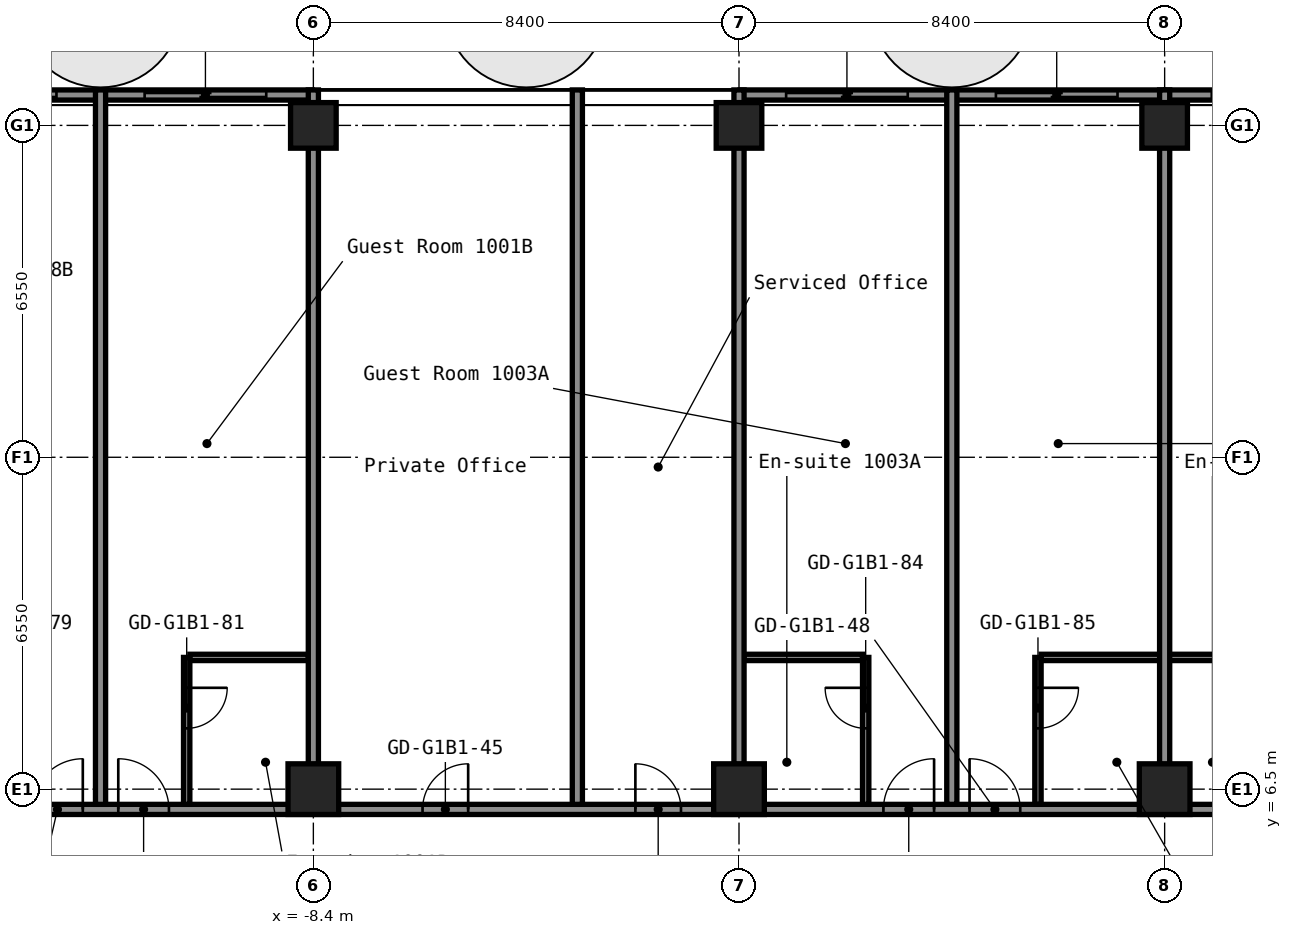
"""IFC4 building model, lengths in metres.
Left out: names, types, materials, properties, quantities, classifications, styles, units other than length and angle.
Written with IfcOpenShell. Run it as: python <this file> out.ifc"""

import sys

from ifc_helpers import new_model, si_unit, direction, frame, frame_2d, origin, origin_2d, place, context, subcontext, project, spatial, rectangle, hollow_rectangle, extrude, element, fill, save


model = new_model("IFC4")
c1 = context("Model", 3, precision=1e-05, world=origin(), true_north=direction((0.0, 1.0)))
c2 = subcontext(c1, "Body", "Model", "MODEL_VIEW")
j1 = project(units=[si_unit("LENGTHUNIT", "METRE"), si_unit("PLANEANGLEUNIT", "RADIAN")], contexts=[c1])
p1 = place(None, origin())
s1 = spatial("IfcSite", under=j1, at=p1, CompositionType="ELEMENT")
p2 = place(p1, origin())
s2 = spatial("IfcBuilding", under=s1, at=p2, CompositionType="ELEMENT")
p3 = place(p2, frame((0.0, 0.0, 39.0)))
s3 = spatial("IfcBuildingStorey", under=s2, at=p3, CompositionType="ELEMENT", Elevation=39.0)
p4 = place(p3, frame((-8.4, 6.5, 0.0), z_axis=(0.0, 0.0, 1.0), x_axis=(1.0, 0.0, 0.0)))
e1 = element("IfcColumn", 1, at=p4, inside=s3, PredefinedType="COLUMN", context=c2, shape_type="SweptSolid", body=[
    extrude(hollow_rectangle(XDim=1.0, YDim=1.0, WallThickness=0.04, at=origin_2d()), origin(), (0.0, 0.0, 1.0), 2.8),
])
p5 = place(p3, frame((-8.4, 19.6, 0.0), z_axis=(0.0, 0.0, 1.0), x_axis=(1.0, 0.0, 0.0)))
e2 = element("IfcColumn", 2, at=p5, inside=s3, PredefinedType="COLUMN", context=c2, shape_type="SweptSolid", body=[
    extrude(hollow_rectangle(XDim=0.9, YDim=0.9, WallThickness=0.036, at=origin_2d()), origin(), (0.0, 0.0, 1.0), 2.8),
])
p6 = place(p3, frame((0.0, 6.5, 0.0), z_axis=(0.0, 0.0, 1.0), x_axis=(1.0, 0.0, 0.0)))
e3 = element("IfcColumn", 3, at=p6, inside=s3, PredefinedType="COLUMN", context=c2, shape_type="SweptSolid", body=[
    extrude(hollow_rectangle(XDim=1.0, YDim=1.0, WallThickness=0.04, at=origin_2d()), origin(), (0.0, 0.0, 1.0), 2.8),
])
p7 = place(p3, frame((0.0, 19.6, 0.0), z_axis=(0.0, 0.0, 1.0), x_axis=(1.0, 0.0, 0.0)))
e4 = element("IfcColumn", 4, at=p7, inside=s3, PredefinedType="COLUMN", context=c2, shape_type="SweptSolid", body=[
    extrude(hollow_rectangle(XDim=0.9, YDim=0.9, WallThickness=0.036, at=origin_2d()), origin(), (0.0, 0.0, 1.0), 2.8),
])
p8 = place(p3, frame((8.4, 6.5, 0.0), z_axis=(0.0, 0.0, 1.0), x_axis=(1.0, 0.0, 0.0)))
e5 = element("IfcColumn", 5, at=p8, inside=s3, PredefinedType="COLUMN", context=c2, shape_type="SweptSolid", body=[
    extrude(hollow_rectangle(XDim=1.0, YDim=1.0, WallThickness=0.04, at=origin_2d()), origin(), (0.0, 0.0, 1.0), 2.8),
])
p9 = place(p3, frame((8.4, 19.6, 0.0), z_axis=(0.0, 0.0, 1.0), x_axis=(1.0, 0.0, 0.0)))
e6 = element("IfcColumn", 6, at=p9, inside=s3, PredefinedType="COLUMN", context=c2, shape_type="SweptSolid", body=[
    extrude(hollow_rectangle(XDim=0.9, YDim=0.9, WallThickness=0.036, at=origin_2d()), origin(), (0.0, 0.0, 1.0), 2.8),
])
p10 = place(p3, frame((-16.8, 6.1, 0.0), z_axis=(0.0, 0.0, 1.0), x_axis=(1.0, 0.0, 0.0)))
e7 = element("IfcWall", 7, at=p10, inside=s3, PredefinedType="PARTITIONING", context=c2, shape_type="SweptSolid", body=[
    extrude(rectangle(XDim=33.6, YDim=0.2, at=frame_2d((16.8, 0.0))), origin(), (0.0, 0.0, 1.0), 2.8),
])
p11 = place(p10, frame((2.85, 0.0, 0.0)))
e8 = element("IfcOpeningElement", 8, at=p11, cuts=e7, PredefinedType="OPENING", context=c2, shape_type="SweptSolid", body=[
    extrude(rectangle(XDim=1.0, YDim=2.1, at=frame_2d((0.5, 1.05))), frame((0.0, 0.11, 0.0), z_axis=(0.0, -1.0, 0.0), x_axis=(1.0, 0.0, 0.0)), (0.0, 0.0, 1.0), 0.22),
])
p12 = place(p10, frame((4.55, 0.0, 0.0)))
e9 = element("IfcOpeningElement", 9, at=p12, cuts=e7, PredefinedType="OPENING", context=c2, shape_type="SweptSolid", body=[
    extrude(rectangle(XDim=1.0, YDim=2.1, at=frame_2d((0.5, 1.05))), frame((0.0, 0.11, 0.0), z_axis=(0.0, -1.0, 0.0), x_axis=(1.0, 0.0, 0.0)), (0.0, 0.0, 1.0), 0.22),
])
p13 = place(p10, frame((10.555, 0.0, 0.0)))
e10 = element("IfcOpeningElement", 10, at=p13, cuts=e7, PredefinedType="OPENING", context=c2, shape_type="SweptSolid", body=[
    extrude(rectangle(XDim=0.9, YDim=2.1, at=frame_2d((0.45, 1.05))), frame((0.0, 0.11, 0.0), z_axis=(0.0, -1.0, 0.0), x_axis=(1.0, 0.0, 0.0)), (0.0, 0.0, 1.0), 0.22),
])
p14 = place(p10, frame((14.755, 0.0, 0.0)))
e11 = element("IfcOpeningElement", 11, at=p14, cuts=e7, PredefinedType="OPENING", context=c2, shape_type="SweptSolid", body=[
    extrude(rectangle(XDim=0.9, YDim=2.1, at=frame_2d((0.45, 1.05))), frame((0.0, 0.11, 0.0), z_axis=(0.0, -1.0, 0.0), x_axis=(1.0, 0.0, 0.0)), (0.0, 0.0, 1.0), 0.22),
])
p15 = place(p10, frame((19.65, 0.0, 0.0)))
e12 = element("IfcOpeningElement", 12, at=p15, cuts=e7, PredefinedType="OPENING", context=c2, shape_type="SweptSolid", body=[
    extrude(rectangle(XDim=1.0, YDim=2.1, at=frame_2d((0.5, 1.05))), frame((0.0, 0.11, 0.0), z_axis=(0.0, -1.0, 0.0), x_axis=(1.0, 0.0, 0.0)), (0.0, 0.0, 1.0), 0.22),
])
p16 = place(p10, frame((21.35, 0.0, 0.0)))
e13 = element("IfcOpeningElement", 13, at=p16, cuts=e7, PredefinedType="OPENING", context=c2, shape_type="SweptSolid", body=[
    extrude(rectangle(XDim=1.0, YDim=2.1, at=frame_2d((0.5, 1.05))), frame((0.0, 0.11, 0.0), z_axis=(0.0, -1.0, 0.0), x_axis=(1.0, 0.0, 0.0)), (0.0, 0.0, 1.0), 0.22),
])
p17 = place(p10, frame((28.05, 0.0, 0.0)))
e14 = element("IfcOpeningElement", 14, at=p17, cuts=e7, PredefinedType="OPENING", context=c2, shape_type="SweptSolid", body=[
    extrude(rectangle(XDim=1.0, YDim=2.1, at=frame_2d((0.5, 1.05))), frame((0.0, 0.11, 0.0), z_axis=(0.0, -1.0, 0.0), x_axis=(1.0, 0.0, 0.0)), (0.0, 0.0, 1.0), 0.22),
])
p18 = place(p10, frame((29.75, 0.0, 0.0)))
e15 = element("IfcOpeningElement", 15, at=p18, cuts=e7, PredefinedType="OPENING", context=c2, shape_type="SweptSolid", body=[
    extrude(rectangle(XDim=1.0, YDim=2.1, at=frame_2d((0.5, 1.05))), frame((0.0, 0.11, 0.0), z_axis=(0.0, -1.0, 0.0), x_axis=(1.0, 0.0, 0.0)), (0.0, 0.0, 1.0), 0.22),
])
for number, where, z_axis, x_axis in (
    (16, (-10.837, 9.1, 0.0), (0.0, 0.0, 1.0), (1.0, 0.0, 0.0)),
    (17, (0.1, 9.1, 0.0), (0.0, 0.0, 1.0), (1.0, 0.0, 0.0)),
):
    element("IfcWall", number, at=place(p3, frame(where, z_axis=z_axis, x_axis=x_axis)), inside=s3, PredefinedType="PARTITIONING", context=c2, shape_type="SweptSolid", body=[
        extrude(rectangle(XDim=2.337, YDim=0.125, at=frame_2d((1.169, 0.0))), origin(), (0.0, 0.0, 1.0), 2.8),
    ])
p19 = place(p3, frame((5.962, 9.1, 0.0), z_axis=(0.0, 0.0, 1.0), x_axis=(1.0, 0.0, 0.0)))
e18 = element("IfcWall", 18, at=p19, inside=s3, PredefinedType="PARTITIONING", context=c2, shape_type="SweptSolid", body=[
    extrude(rectangle(XDim=4.875, YDim=0.125, at=frame_2d((2.438, 0.0))), origin(), (0.0, 0.0, 1.0), 2.8),
])
p20 = place(p3, frame((-12.6, 6.2, 0.0), z_axis=(0.0, 0.0, 1.0), x_axis=(0.0, 1.0, 0.0)))
e19 = element("IfcWall", 19, at=p20, inside=s3, PredefinedType="PARTITIONING", context=c2, shape_type="SweptSolid", body=[
    extrude(rectangle(XDim=14.1, YDim=0.2, at=frame_2d((7.05, 0.0))), origin(), (0.0, 0.0, 1.0), 2.8),
])
p21 = place(p3, frame((-10.9, 6.2, 0.0), z_axis=(0.0, 0.0, 1.0), x_axis=(0.0, 1.0, 0.0)))
e20 = element("IfcWall", 20, at=p21, inside=s3, PredefinedType="PARTITIONING", context=c2, shape_type="SweptSolid", body=[
    extrude(rectangle(XDim=2.9, YDim=0.125, at=frame_2d((1.45, 0.0))), origin(), (0.0, 0.0, 1.0), 2.8),
])
p22 = place(p21, frame((1.5, 0.0, 0.0)))
e21 = element("IfcOpeningElement", 21, at=p22, cuts=e20, PredefinedType="OPENING", context=c2, shape_type="SweptSolid", body=[
    extrude(rectangle(XDim=0.8, YDim=2.1, at=frame_2d((0.4, 1.05))), frame((0.0, 0.073, 0.0), z_axis=(0.0, -1.0, 0.0), x_axis=(1.0, 0.0, 0.0)), (0.0, 0.0, 1.0), 0.145),
])
p23 = place(p3, frame((-8.4, 6.99, 0.0), z_axis=(0.0, 0.0, 1.0), x_axis=(0.0, 1.0, 0.0)))
e22 = element("IfcWall", 22, at=p23, inside=s3, PredefinedType="PARTITIONING", context=c2, shape_type="SweptSolid", body=[
    extrude(rectangle(XDim=13.31, YDim=0.2, at=frame_2d((6.655, 0.0))), origin(), (0.0, 0.0, 1.0), 2.8),
])
p24 = place(p3, frame((-3.19, 6.2, 0.0), z_axis=(0.0, 0.0, 1.0), x_axis=(0.0, 1.0, 0.0)))
e23 = element("IfcWall", 23, at=p24, inside=s3, PredefinedType="PARTITIONING", context=c2, shape_type="SweptSolid", body=[
    extrude(rectangle(XDim=14.1, YDim=0.2, at=frame_2d((7.05, 0.0))), origin(), (0.0, 0.0, 1.0), 2.8),
])
p25 = place(p3, frame((0.0, 6.99, 0.0), z_axis=(0.0, 0.0, 1.0), x_axis=(0.0, 1.0, 0.0)))
e24 = element("IfcWall", 24, at=p25, inside=s3, PredefinedType="PARTITIONING", context=c2, shape_type="SweptSolid", body=[
    extrude(rectangle(XDim=13.31, YDim=0.2, at=frame_2d((6.655, 0.0))), origin(), (0.0, 0.0, 1.0), 2.8),
])
p26 = place(p3, frame((2.5, 6.2, 0.0), z_axis=(0.0, 0.0, 1.0), x_axis=(0.0, 1.0, 0.0)))
e25 = element("IfcWall", 25, at=p26, inside=s3, PredefinedType="PARTITIONING", context=c2, shape_type="SweptSolid", body=[
    extrude(rectangle(XDim=2.9, YDim=0.125, at=frame_2d((1.45, 0.0))), origin(), (0.0, 0.0, 1.0), 2.8),
])
p27 = place(p26, frame((1.5, 0.0, 0.0)))
e26 = element("IfcOpeningElement", 26, at=p27, cuts=e25, PredefinedType="OPENING", context=c2, shape_type="SweptSolid", body=[
    extrude(rectangle(XDim=0.8, YDim=2.1, at=frame_2d((0.4, 1.05))), frame((0.0, 0.073, 0.0), z_axis=(0.0, -1.0, 0.0), x_axis=(1.0, 0.0, 0.0)), (0.0, 0.0, 1.0), 0.145),
])
p28 = place(p3, frame((4.2, 6.2, 0.0), z_axis=(0.0, 0.0, 1.0), x_axis=(0.0, 1.0, 0.0)))
e27 = element("IfcWall", 27, at=p28, inside=s3, PredefinedType="PARTITIONING", context=c2, shape_type="SweptSolid", body=[
    extrude(rectangle(XDim=14.1, YDim=0.2, at=frame_2d((7.05, 0.0))), origin(), (0.0, 0.0, 1.0), 2.8),
])
p29 = place(p3, frame((5.9, 6.2, 0.0), z_axis=(0.0, 0.0, 1.0), x_axis=(0.0, 1.0, 0.0)))
e28 = element("IfcWall", 28, at=p29, inside=s3, PredefinedType="PARTITIONING", context=c2, shape_type="SweptSolid", body=[
    extrude(rectangle(XDim=2.9, YDim=0.125, at=frame_2d((1.45, 0.0))), origin(), (0.0, 0.0, 1.0), 2.8),
])
p30 = place(p29, frame((1.5, 0.0, 0.0)))
e29 = element("IfcOpeningElement", 29, at=p30, cuts=e28, PredefinedType="OPENING", context=c2, shape_type="SweptSolid", body=[
    extrude(rectangle(XDim=0.8, YDim=2.1, at=frame_2d((0.4, 1.05))), frame((0.0, 0.073, 0.0), z_axis=(0.0, -1.0, 0.0), x_axis=(1.0, 0.0, 0.0)), (0.0, 0.0, 1.0), 0.145),
])
p31 = place(p3, frame((8.4, 6.99, 0.0), z_axis=(0.0, 0.0, 1.0), x_axis=(0.0, 1.0, 0.0)))
e30 = element("IfcWall", 30, at=p31, inside=s3, PredefinedType="PARTITIONING", context=c2, shape_type="SweptSolid", body=[
    extrude(rectangle(XDim=13.31, YDim=0.2, at=frame_2d((6.655, 0.0))), origin(), (0.0, 0.0, 1.0), 2.8),
])
p32 = place(p3, frame((12.64, 20.2, 0.0), z_axis=(0.0, 0.0, 1.0), x_axis=(-1.0, 0.0, 0.0)))
p33 = place(p32, frame((0.91, 0.0, 0.0)))
p34 = place(p33, frame((2.4, 0.0, 0.0), z_axis=(0.0, 0.0, 1.0), x_axis=(-1.0, 0.0, 0.0)))
e31 = element("IfcDoor", 31, at=p34, inside=s3, OperationType="SLIDING_TO_LEFT", PredefinedType="DOOR", context=c2, shape_type="SweptSolid", body=[
    extrude(rectangle(XDim=2.4, YDim=2.2, at=frame_2d((1.2, 1.1))), frame((0.0, 0.025, 0.0), z_axis=(0.0, -1.0, 0.0), x_axis=(1.0, 0.0, 0.0)), (0.0, 0.0, 1.0), 0.05),
])
p35 = place(p3, frame((8.38, 20.2, 0.0), z_axis=(0.0, 0.0, 1.0), x_axis=(-1.0, 0.0, 0.0)))
p36 = place(p35, frame((0.91, 0.0, 0.0)))
p37 = place(p36, frame((2.4, 0.0, 0.0), z_axis=(0.0, 0.0, 1.0), x_axis=(-1.0, 0.0, 0.0)))
e32 = element("IfcDoor", 32, at=p37, inside=s3, OperationType="SLIDING_TO_LEFT", PredefinedType="DOOR", context=c2, shape_type="SweptSolid", body=[
    extrude(rectangle(XDim=2.4, YDim=2.2, at=frame_2d((1.2, 1.1))), frame((0.0, 0.025, 0.0), z_axis=(0.0, -1.0, 0.0), x_axis=(1.0, 0.0, 0.0)), (0.0, 0.0, 1.0), 0.05),
])
p38 = place(p3, frame((4.24, 20.2, 0.0), z_axis=(0.0, 0.0, 1.0), x_axis=(-1.0, 0.0, 0.0)))
p39 = place(p38, frame((0.91, 0.0, 0.0)))
p40 = place(p39, frame((2.4, 0.0, 0.0), z_axis=(0.0, 0.0, 1.0), x_axis=(-1.0, 0.0, 0.0)))
e33 = element("IfcDoor", 33, at=p40, inside=s3, OperationType="SLIDING_TO_LEFT", PredefinedType="DOOR", context=c2, shape_type="SweptSolid", body=[
    extrude(rectangle(XDim=2.4, YDim=2.2, at=frame_2d((1.2, 1.1))), frame((0.0, 0.025, 0.0), z_axis=(0.0, -1.0, 0.0), x_axis=(1.0, 0.0, 0.0)), (0.0, 0.0, 1.0), 0.05),
])
p41 = place(p3, frame((-8.42, 20.2, 0.0), z_axis=(0.0, 0.0, 1.0), x_axis=(-1.0, 0.0, 0.0)))
p42 = place(p41, frame((0.91, 0.0, 0.0)))
p43 = place(p42, frame((2.4, 0.0, 0.0), z_axis=(0.0, 0.0, 1.0), x_axis=(-1.0, 0.0, 0.0)))
e34 = element("IfcDoor", 34, at=p43, inside=s3, OperationType="SLIDING_TO_LEFT", PredefinedType="DOOR", context=c2, shape_type="SweptSolid", body=[
    extrude(rectangle(XDim=2.4, YDim=2.2, at=frame_2d((1.2, 1.1))), frame((0.0, 0.025, 0.0), z_axis=(0.0, -1.0, 0.0), x_axis=(1.0, 0.0, 0.0)), (0.0, 0.0, 1.0), 0.05),
])
p44 = place(p3, frame((-12.56, 20.2, 0.0), z_axis=(0.0, 0.0, 1.0), x_axis=(-1.0, 0.0, 0.0)))
p45 = place(p44, frame((0.91, 0.0, 0.0)))
p46 = place(p45, frame((2.4, 0.0, 0.0), z_axis=(0.0, 0.0, 1.0), x_axis=(-1.0, 0.0, 0.0)))
e35 = element("IfcDoor", 35, at=p46, inside=s3, OperationType="SLIDING_TO_LEFT", PredefinedType="DOOR", context=c2, shape_type="SweptSolid", body=[
    extrude(rectangle(XDim=2.4, YDim=2.2, at=frame_2d((1.2, 1.1))), frame((0.0, 0.025, 0.0), z_axis=(0.0, -1.0, 0.0), x_axis=(1.0, 0.0, 0.0)), (0.0, 0.0, 1.0), 0.05),
])
p47 = place(p11, origin())
e36 = element("IfcDoor", 36, at=p47, inside=s3, OperationType="SINGLE_SWING_LEFT", PredefinedType="DOOR", context=c2, shape_type="SweptSolid", body=[
    extrude(rectangle(XDim=1.0, YDim=2.1, at=frame_2d((0.5, 1.05))), frame((0.0, 0.025, 0.0), z_axis=(0.0, -1.0, 0.0), x_axis=(1.0, 0.0, 0.0)), (0.0, 0.0, 1.0), 0.05),
])
fill(e8, e36)
p48 = place(p12, origin())
e37 = element("IfcDoor", 37, at=p48, inside=s3, OperationType="SINGLE_SWING_RIGHT", PredefinedType="DOOR", context=c2, shape_type="SweptSolid", body=[
    extrude(rectangle(XDim=1.0, YDim=2.1, at=frame_2d((0.5, 1.05))), frame((0.0, 0.025, 0.0), z_axis=(0.0, -1.0, 0.0), x_axis=(1.0, 0.0, 0.0)), (0.0, 0.0, 1.0), 0.05),
])
fill(e9, e37)
p49 = place(p13, origin())
e38 = element("IfcDoor", 38, at=p49, inside=s3, OperationType="SINGLE_SWING_LEFT", PredefinedType="DOOR", context=c2, shape_type="SweptSolid", body=[
    extrude(rectangle(XDim=0.9, YDim=2.1, at=frame_2d((0.45, 1.05))), frame((0.0, 0.025, 0.0), z_axis=(0.0, -1.0, 0.0), x_axis=(1.0, 0.0, 0.0)), (0.0, 0.0, 1.0), 0.05),
])
fill(e10, e38)
p50 = place(p14, origin())
e39 = element("IfcDoor", 39, at=p50, inside=s3, OperationType="SINGLE_SWING_RIGHT", PredefinedType="DOOR", context=c2, shape_type="SweptSolid", body=[
    extrude(rectangle(XDim=0.9, YDim=2.1, at=frame_2d((0.45, 1.05))), frame((0.0, 0.025, 0.0), z_axis=(0.0, -1.0, 0.0), x_axis=(1.0, 0.0, 0.0)), (0.0, 0.0, 1.0), 0.05),
])
fill(e11, e39)
p51 = place(p15, origin())
e40 = element("IfcDoor", 40, at=p51, inside=s3, OperationType="SINGLE_SWING_LEFT", PredefinedType="DOOR", context=c2, shape_type="SweptSolid", body=[
    extrude(rectangle(XDim=1.0, YDim=2.1, at=frame_2d((0.5, 1.05))), frame((0.0, 0.025, 0.0), z_axis=(0.0, -1.0, 0.0), x_axis=(1.0, 0.0, 0.0)), (0.0, 0.0, 1.0), 0.05),
])
fill(e12, e40)
p52 = place(p16, origin())
e41 = element("IfcDoor", 41, at=p52, inside=s3, OperationType="SINGLE_SWING_RIGHT", PredefinedType="DOOR", context=c2, shape_type="SweptSolid", body=[
    extrude(rectangle(XDim=1.0, YDim=2.1, at=frame_2d((0.5, 1.05))), frame((0.0, 0.025, 0.0), z_axis=(0.0, -1.0, 0.0), x_axis=(1.0, 0.0, 0.0)), (0.0, 0.0, 1.0), 0.05),
])
fill(e13, e41)
p53 = place(p22, origin())
e42 = element("IfcDoor", 42, at=p53, inside=s3, OperationType="SINGLE_SWING_RIGHT", PredefinedType="DOOR", context=c2, shape_type="SweptSolid", body=[
    extrude(rectangle(XDim=0.8, YDim=2.1, at=frame_2d((0.4, 1.05))), frame((0.0, 0.025, 0.0), z_axis=(0.0, -1.0, 0.0), x_axis=(1.0, 0.0, 0.0)), (0.0, 0.0, 1.0), 0.05),
])
fill(e21, e42)
p54 = place(p27, origin())
e43 = element("IfcDoor", 43, at=p54, inside=s3, OperationType="SINGLE_SWING_LEFT", PredefinedType="DOOR", context=c2, shape_type="SweptSolid", body=[
    extrude(rectangle(XDim=0.8, YDim=2.1, at=frame_2d((0.4, 1.05))), frame((0.0, 0.025, 0.0), z_axis=(0.0, -1.0, 0.0), x_axis=(1.0, 0.0, 0.0)), (0.0, 0.0, 1.0), 0.05),
])
fill(e26, e43)
p55 = place(p30, origin())
e44 = element("IfcDoor", 44, at=p55, inside=s3, OperationType="SINGLE_SWING_RIGHT", PredefinedType="DOOR", context=c2, shape_type="SweptSolid", body=[
    extrude(rectangle(XDim=0.8, YDim=2.1, at=frame_2d((0.4, 1.05))), frame((0.0, 0.025, 0.0), z_axis=(0.0, -1.0, 0.0), x_axis=(1.0, 0.0, 0.0)), (0.0, 0.0, 1.0), 0.05),
])
fill(e29, e44)
save(model, sys.argv[1])
